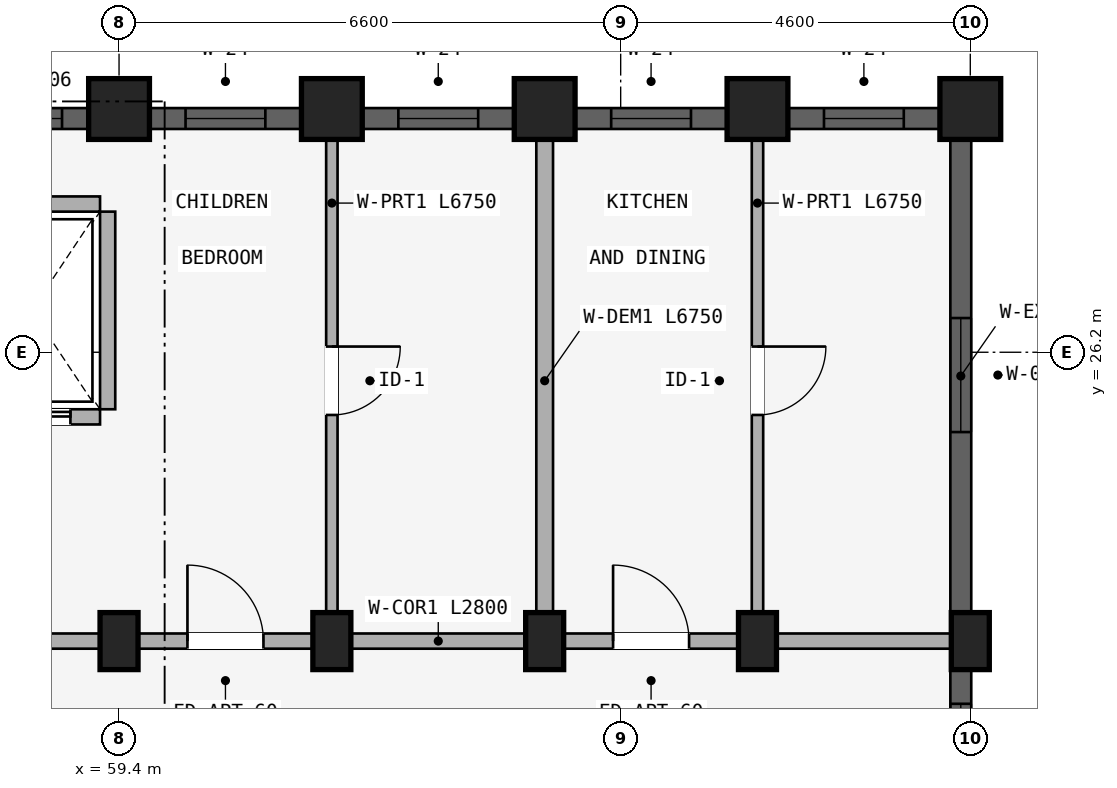
"""IFC4 building model, lengths in metres.
Left out: names, types, materials, properties, quantities, classifications, styles, units other than length and angle.
Written with IfcOpenShell. Run it as: python <this file> out.ifc"""

import sys

from ifc_helpers import new_model, si_unit, direction, frame, frame_2d, origin, origin_2d, place, context, subcontext, project, spatial, rectangle, extrude, element, fill, save


model = new_model("IFC4")
c1 = context("Model", 3, precision=1e-05, world=origin(), true_north=direction((0.0, 1.0)))
c2 = subcontext(c1, "Body", "Model", "MODEL_VIEW")
j1 = project(units=[si_unit("LENGTHUNIT", "METRE"), si_unit("PLANEANGLEUNIT", "RADIAN")], contexts=[c1])
p1 = place(None, origin())
s1 = spatial("IfcSite", under=j1, at=p1, CompositionType="ELEMENT")
p2 = place(p1, origin())
s2 = spatial("IfcBuilding", under=s1, at=p2, CompositionType="ELEMENT")
p3 = place(p2, frame((0.0, 0.0, 8.7)))
s3 = spatial("IfcBuildingStorey", under=s2, at=p3, CompositionType="ELEMENT", Elevation=8.7)
p4 = place(p3, frame((59.4, 29.4, 0.0), z_axis=(0.0, 0.0, 1.0), x_axis=(1.0, 0.0, 0.0)))
e1 = element("IfcColumn", 1, at=p4, inside=s3, PredefinedType="COLUMN", context=c2, shape_type="SweptSolid", body=[
    extrude(rectangle(XDim=0.8, YDim=0.8, at=origin_2d()), origin(), (0.0, 0.0, 1.0), 2.93),
])
p5 = place(p3, frame((59.4, 22.4, 0.0), z_axis=(0.0, 0.0, 1.0), x_axis=(1.0, 0.0, 0.0)))
e2 = element("IfcColumn", 2, at=p5, inside=s3, PredefinedType="COLUMN", context=c2, shape_type="SweptSolid", body=[
    extrude(rectangle(XDim=0.5, YDim=0.75, at=origin_2d()), origin(), (0.0, 0.0, 1.0), 2.93),
])
p6 = place(p3, frame((62.2, 29.4, 0.0), z_axis=(0.0, 0.0, 1.0), x_axis=(1.0, 0.0, 0.0)))
e3 = element("IfcColumn", 3, at=p6, inside=s3, PredefinedType="COLUMN", context=c2, shape_type="SweptSolid", body=[
    extrude(rectangle(XDim=0.8, YDim=0.8, at=origin_2d()), origin(), (0.0, 0.0, 1.0), 2.93),
])
p7 = place(p3, frame((62.2, 22.4, 0.0), z_axis=(0.0, 0.0, 1.0), x_axis=(1.0, 0.0, 0.0)))
e4 = element("IfcColumn", 4, at=p7, inside=s3, PredefinedType="COLUMN", context=c2, shape_type="SweptSolid", body=[
    extrude(rectangle(XDim=0.5, YDim=0.75, at=origin_2d()), origin(), (0.0, 0.0, 1.0), 2.93),
])
p8 = place(p3, frame((65.0, 29.4, 0.0), z_axis=(0.0, 0.0, 1.0), x_axis=(1.0, 0.0, 0.0)))
e5 = element("IfcColumn", 5, at=p8, inside=s3, PredefinedType="COLUMN", context=c2, shape_type="SweptSolid", body=[
    extrude(rectangle(XDim=0.8, YDim=0.8, at=origin_2d()), origin(), (0.0, 0.0, 1.0), 2.93),
])
p9 = place(p3, frame((65.0, 22.4, 0.0), z_axis=(0.0, 0.0, 1.0), x_axis=(1.0, 0.0, 0.0)))
e6 = element("IfcColumn", 6, at=p9, inside=s3, PredefinedType="COLUMN", context=c2, shape_type="SweptSolid", body=[
    extrude(rectangle(XDim=0.5, YDim=0.75, at=origin_2d()), origin(), (0.0, 0.0, 1.0), 2.93),
])
p10 = place(p3, frame((67.8, 29.4, 0.0), z_axis=(0.0, 0.0, 1.0), x_axis=(1.0, 0.0, 0.0)))
e7 = element("IfcColumn", 7, at=p10, inside=s3, PredefinedType="COLUMN", context=c2, shape_type="SweptSolid", body=[
    extrude(rectangle(XDim=0.8, YDim=0.8, at=origin_2d()), origin(), (0.0, 0.0, 1.0), 2.93),
])
p11 = place(p3, frame((67.8, 22.4, 0.0), z_axis=(0.0, 0.0, 1.0), x_axis=(1.0, 0.0, 0.0)))
e8 = element("IfcColumn", 8, at=p11, inside=s3, PredefinedType="COLUMN", context=c2, shape_type="SweptSolid", body=[
    extrude(rectangle(XDim=0.5, YDim=0.75, at=origin_2d()), origin(), (0.0, 0.0, 1.0), 2.93),
])
p12 = place(p3, frame((70.6, 29.4, 0.0), z_axis=(0.0, 0.0, 1.0), x_axis=(1.0, 0.0, 0.0)))
e9 = element("IfcColumn", 9, at=p12, inside=s3, PredefinedType="COLUMN", context=c2, shape_type="SweptSolid", body=[
    extrude(rectangle(XDim=0.8, YDim=0.8, at=origin_2d()), origin(), (0.0, 0.0, 1.0), 2.93),
])
p13 = place(p3, frame((70.6, 22.4, 0.0), z_axis=(0.0, 0.0, 1.0), x_axis=(1.0, 0.0, 0.0)))
e10 = element("IfcColumn", 10, at=p13, inside=s3, PredefinedType="COLUMN", context=c2, shape_type="SweptSolid", body=[
    extrude(rectangle(XDim=0.5, YDim=0.75, at=origin_2d()), origin(), (0.0, 0.0, 1.0), 2.93),
])
p14 = place(p3, frame((59.25, 28.05, 0.0), z_axis=(0.0, 0.0, 1.0), x_axis=(0.0, -1.0, 0.0)))
e11 = element("IfcWall", 11, at=p14, inside=s3, PredefinedType="STANDARD", context=c2, shape_type="SweptSolid", body=[
    extrude(rectangle(XDim=2.6, YDim=0.2, at=frame_2d((1.3, 0.0))), origin(), (0.0, 0.0, 1.0), 2.372),
])
p15 = place(p3, frame((57.35, 28.15, 0.0), z_axis=(0.0, 0.0, 1.0), x_axis=(1.0, 0.0, 0.0)))
e12 = element("IfcWall", 12, at=p15, inside=s3, PredefinedType="STANDARD", context=c2, shape_type="SweptSolid", body=[
    extrude(rectangle(XDim=1.8, YDim=0.2, at=frame_2d((0.9, 0.0))), origin(), (0.0, 0.0, 1.0), 2.93),
])
p16 = place(p3, frame((57.35, 25.35, 0.0), z_axis=(0.0, 0.0, 1.0), x_axis=(1.0, 0.0, 0.0)))
e13 = element("IfcWall", 13, at=p16, inside=s3, PredefinedType="STANDARD", context=c2, shape_type="SweptSolid", body=[
    extrude(rectangle(XDim=1.8, YDim=0.2, at=frame_2d((0.9, 0.0))), origin(), (0.0, 0.0, 1.0), 2.93),
])
p17 = place(p16, frame((0.39, 0.0, 0.0)))
e14 = element("IfcOpeningElement", 14, at=p17, cuts=e13, PredefinedType="OPENING", context=c2, shape_type="SweptSolid", body=[
    extrude(rectangle(XDim=1.02, YDim=2.15, at=frame_2d((0.51, 1.075))), frame((0.0, 0.11, 0.0), z_axis=(0.0, -1.0, 0.0), x_axis=(1.0, 0.0, 0.0)), (0.0, 0.0, 1.0), 0.22),
])
p18 = place(p3, frame((53.75, 22.4, 0.0), z_axis=(0.0, 0.0, 1.0), x_axis=(1.0, 0.0, 0.0)))
e15 = element("IfcWall", 15, at=p18, inside=s3, PredefinedType="STANDARD", context=c2, shape_type="SweptSolid", body=[
    extrude(rectangle(XDim=5.6, YDim=0.2, at=frame_2d((2.8, 0.0))), origin(), (0.0, 0.0, 1.0), 2.372),
])
p19 = place(p18, frame((1.91, 0.0, 0.0)))
e16 = element("IfcOpeningElement", 16, at=p19, cuts=e15, PredefinedType="OPENING", context=c2, shape_type="SweptSolid", body=[
    extrude(rectangle(XDim=1.22, YDim=2.15, at=frame_2d((0.61, 1.075))), frame((0.0, 0.11, 0.0), z_axis=(0.0, -1.0, 0.0), x_axis=(1.0, 0.0, 0.0)), (0.0, 0.0, 1.0), 0.22),
])
p20 = place(p3, frame((59.4, 22.4, 0.0), z_axis=(0.0, 0.0, 1.0), x_axis=(1.0, 0.0, 0.0)))
e17 = element("IfcWall", 17, at=p20, inside=s3, PredefinedType="STANDARD", context=c2, shape_type="SweptSolid", body=[
    extrude(rectangle(XDim=2.8, YDim=0.2, at=frame_2d((1.4, 0.0))), origin(), (0.0, 0.0, 1.0), 2.372),
])
p21 = place(p20, frame((0.9, 0.0, 0.0)))
e18 = element("IfcOpeningElement", 18, at=p21, cuts=e17, PredefinedType="OPENING", context=c2, shape_type="SweptSolid", body=[
    extrude(rectangle(XDim=1.0, YDim=2.15, at=frame_2d((0.5, 1.075))), frame((0.0, 0.11, 0.0), z_axis=(0.0, -1.0, 0.0), x_axis=(1.0, 0.0, 0.0)), (0.0, 0.0, 1.0), 0.22),
])
p22 = place(p3, frame((62.2, 22.4, 0.0), z_axis=(0.0, 0.0, 1.0), x_axis=(1.0, 0.0, 0.0)))
e19 = element("IfcWall", 19, at=p22, inside=s3, PredefinedType="STANDARD", context=c2, shape_type="SweptSolid", body=[
    extrude(rectangle(XDim=2.8, YDim=0.2, at=frame_2d((1.4, 0.0))), origin(), (0.0, 0.0, 1.0), 2.372),
])
p23 = place(p3, frame((65.0, 22.4, 0.0), z_axis=(0.0, 0.0, 1.0), x_axis=(1.0, 0.0, 0.0)))
e20 = element("IfcWall", 20, at=p23, inside=s3, PredefinedType="STANDARD", context=c2, shape_type="SweptSolid", body=[
    extrude(rectangle(XDim=2.8, YDim=0.2, at=frame_2d((1.4, 0.0))), origin(), (0.0, 0.0, 1.0), 2.372),
])
p24 = place(p23, frame((0.9, 0.0, 0.0)))
e21 = element("IfcOpeningElement", 21, at=p24, cuts=e20, PredefinedType="OPENING", context=c2, shape_type="SweptSolid", body=[
    extrude(rectangle(XDim=1.0, YDim=2.15, at=frame_2d((0.5, 1.075))), frame((0.0, 0.11, 0.0), z_axis=(0.0, -1.0, 0.0), x_axis=(1.0, 0.0, 0.0)), (0.0, 0.0, 1.0), 0.22),
])
p25 = place(p3, frame((67.8, 22.4, 0.0), z_axis=(0.0, 0.0, 1.0), x_axis=(1.0, 0.0, 0.0)))
e22 = element("IfcWall", 22, at=p25, inside=s3, PredefinedType="STANDARD", context=c2, shape_type="SweptSolid", body=[
    extrude(rectangle(XDim=2.8, YDim=0.2, at=frame_2d((1.4, 0.0))), origin(), (0.0, 0.0, 1.0), 2.372),
])
p26 = place(p3, frame((62.2, 29.2, 0.0), z_axis=(0.0, 0.0, 1.0), x_axis=(0.0, -1.0, 0.0)))
e23 = element("IfcWall", 23, at=p26, inside=s3, PredefinedType="PARTITIONING", context=c2, shape_type="SweptSolid", body=[
    extrude(rectangle(XDim=6.75, YDim=0.15, at=frame_2d((3.375, 0.0))), origin(), (0.0, 0.0, 1.0), 2.372),
])
p27 = place(p26, frame((2.925, 0.0, 0.0)))
e24 = element("IfcOpeningElement", 24, at=p27, cuts=e23, PredefinedType="OPENING", context=c2, shape_type="SweptSolid", body=[
    extrude(rectangle(XDim=0.9, YDim=2.1, at=frame_2d((0.45, 1.05))), frame((0.0, 0.085, 0.0), z_axis=(0.0, -1.0, 0.0), x_axis=(1.0, 0.0, 0.0)), (0.0, 0.0, 1.0), 0.17),
])
p28 = place(p3, frame((65.0, 29.2, 0.0), z_axis=(0.0, 0.0, 1.0), x_axis=(0.0, -1.0, 0.0)))
e25 = element("IfcWall", 25, at=p28, inside=s3, PredefinedType="STANDARD", context=c2, shape_type="SweptSolid", body=[
    extrude(rectangle(XDim=6.75, YDim=0.22, at=frame_2d((3.375, 0.0))), origin(), (0.0, 0.0, 1.0), 2.372),
])
p29 = place(p3, frame((67.8, 29.2, 0.0), z_axis=(0.0, 0.0, 1.0), x_axis=(0.0, -1.0, 0.0)))
e26 = element("IfcWall", 26, at=p29, inside=s3, PredefinedType="PARTITIONING", context=c2, shape_type="SweptSolid", body=[
    extrude(rectangle(XDim=6.75, YDim=0.15, at=frame_2d((3.375, 0.0))), origin(), (0.0, 0.0, 1.0), 2.372),
])
p30 = place(p29, frame((2.925, 0.0, 0.0)))
e27 = element("IfcOpeningElement", 27, at=p30, cuts=e26, PredefinedType="OPENING", context=c2, shape_type="SweptSolid", body=[
    extrude(rectangle(XDim=0.9, YDim=2.1, at=frame_2d((0.45, 1.05))), frame((0.0, 0.085, 0.0), z_axis=(0.0, -1.0, 0.0), x_axis=(1.0, 0.0, 0.0)), (0.0, 0.0, 1.0), 0.17),
])
p31 = place(p3, frame((56.628, 29.275, 0.0), z_axis=(0.0, 0.0, 1.0), x_axis=(1.0, 0.0, 0.0)))
e28 = element("IfcWall", 28, at=p31, inside=s3, PredefinedType="STANDARD", context=c2, shape_type="SweptSolid", body=[
    extrude(rectangle(XDim=2.422, YDim=0.275, at=frame_2d((1.211, 0.0))), origin(), (0.0, 0.0, 1.0), 2.472),
])
p32 = place(p31, frame((0.822, 0.0, 0.772)))
e29 = element("IfcOpeningElement", 29, at=p32, cuts=e28, PredefinedType="OPENING", context=c2, shape_type="SweptSolid", body=[
    extrude(rectangle(XDim=1.2, YDim=1.5, at=frame_2d((0.6, 0.75))), frame((0.0, 0.147, 0.0), z_axis=(0.0, -1.0, 0.0), x_axis=(1.0, 0.0, 0.0)), (0.0, 0.0, 1.0), 0.295),
])
p33 = place(p3, frame((59.803, 29.275, 0.0), z_axis=(0.0, 0.0, 1.0), x_axis=(1.0, 0.0, 0.0)))
e30 = element("IfcWall", 30, at=p33, inside=s3, PredefinedType="STANDARD", context=c2, shape_type="SweptSolid", body=[
    extrude(rectangle(XDim=1.993, YDim=0.275, at=frame_2d((0.997, 0.0))), origin(), (0.0, 0.0, 1.0), 2.472),
])
p34 = place(p33, frame((0.471, 0.0, 0.88)))
e31 = element("IfcOpeningElement", 31, at=p34, cuts=e30, PredefinedType="OPENING", context=c2, shape_type="SweptSolid", body=[
    extrude(rectangle(XDim=1.05, YDim=1.25, at=frame_2d((0.525, 0.625))), frame((0.0, 0.147, 0.0), z_axis=(0.0, -1.0, 0.0), x_axis=(1.0, 0.0, 0.0)), (0.0, 0.0, 1.0), 0.295),
])
p35 = place(p3, frame((62.604, 29.275, 0.0), z_axis=(0.0, 0.0, 1.0), x_axis=(1.0, 0.0, 0.0)))
e32 = element("IfcWall", 32, at=p35, inside=s3, PredefinedType="STANDARD", context=c2, shape_type="SweptSolid", body=[
    extrude(rectangle(XDim=1.993, YDim=0.275, at=frame_2d((0.997, 0.0))), origin(), (0.0, 0.0, 1.0), 2.472),
])
p36 = place(p35, frame((0.471, 0.0, 0.88)))
e33 = element("IfcOpeningElement", 33, at=p36, cuts=e32, PredefinedType="OPENING", context=c2, shape_type="SweptSolid", body=[
    extrude(rectangle(XDim=1.05, YDim=1.25, at=frame_2d((0.525, 0.625))), frame((0.0, 0.147, 0.0), z_axis=(0.0, -1.0, 0.0), x_axis=(1.0, 0.0, 0.0)), (0.0, 0.0, 1.0), 0.295),
])
p37 = place(p3, frame((65.404, 29.275, 0.0), z_axis=(0.0, 0.0, 1.0), x_axis=(1.0, 0.0, 0.0)))
e34 = element("IfcWall", 34, at=p37, inside=s3, PredefinedType="STANDARD", context=c2, shape_type="SweptSolid", body=[
    extrude(rectangle(XDim=1.993, YDim=0.275, at=frame_2d((0.997, 0.0))), origin(), (0.0, 0.0, 1.0), 2.472),
])
p38 = place(p37, frame((0.471, 0.0, 0.88)))
e35 = element("IfcOpeningElement", 35, at=p38, cuts=e34, PredefinedType="OPENING", context=c2, shape_type="SweptSolid", body=[
    extrude(rectangle(XDim=1.05, YDim=1.25, at=frame_2d((0.525, 0.625))), frame((0.0, 0.147, 0.0), z_axis=(0.0, -1.0, 0.0), x_axis=(1.0, 0.0, 0.0)), (0.0, 0.0, 1.0), 0.295),
])
p39 = place(p3, frame((68.204, 29.275, 0.0), z_axis=(0.0, 0.0, 1.0), x_axis=(1.0, 0.0, 0.0)))
e36 = element("IfcWall", 36, at=p39, inside=s3, PredefinedType="STANDARD", context=c2, shape_type="SweptSolid", body=[
    extrude(rectangle(XDim=1.993, YDim=0.275, at=frame_2d((0.997, 0.0))), origin(), (0.0, 0.0, 1.0), 2.472),
])
p40 = place(p39, frame((0.471, 0.0, 0.88)))
e37 = element("IfcOpeningElement", 37, at=p40, cuts=e36, PredefinedType="OPENING", context=c2, shape_type="SweptSolid", body=[
    extrude(rectangle(XDim=1.05, YDim=1.25, at=frame_2d((0.525, 0.625))), frame((0.0, 0.147, 0.0), z_axis=(0.0, -1.0, 0.0), x_axis=(1.0, 0.0, 0.0)), (0.0, 0.0, 1.0), 0.295),
])
p41 = place(p3, frame((70.475, 28.997, 0.0), z_axis=(0.0, 0.0, 1.0), x_axis=(0.0, -1.0, 0.0)))
e38 = element("IfcWall", 38, at=p41, inside=s3, PredefinedType="STANDARD", context=c2, shape_type="SweptSolid", body=[
    extrude(rectangle(XDim=6.218, YDim=0.275, at=frame_2d((3.109, 0.0))), origin(), (0.0, 0.0, 1.0), 2.372),
])
p42 = place(p41, frame((2.346, 0.0, 0.522)))
e39 = element("IfcOpeningElement", 39, at=p42, cuts=e38, PredefinedType="OPENING", context=c2, shape_type="SweptSolid", body=[
    extrude(rectangle(XDim=1.5, YDim=1.65, at=frame_2d((0.75, 0.825))), frame((0.0, 0.147, 0.0), z_axis=(0.0, -1.0, 0.0), x_axis=(1.0, 0.0, 0.0)), (0.0, 0.0, 1.0), 0.295),
])
p43 = place(p3, frame((70.475, 22.021, 0.0), z_axis=(0.0, 0.0, 1.0), x_axis=(0.0, -1.0, 0.0)))
e40 = element("IfcWall", 40, at=p43, inside=s3, PredefinedType="STANDARD", context=c2, shape_type="SweptSolid", body=[
    extrude(rectangle(XDim=1.643, YDim=0.275, at=frame_2d((0.822, 0.0))), origin(), (0.0, 0.0, 1.0), 2.372),
])
p44 = place(p43, frame((0.447, 0.0, 0.88)))
e41 = element("IfcOpeningElement", 41, at=p44, cuts=e40, PredefinedType="OPENING", context=c2, shape_type="SweptSolid", body=[
    extrude(rectangle(XDim=0.75, YDim=1.05, at=frame_2d((0.375, 0.525))), frame((0.0, 0.147, 0.0), z_axis=(0.0, -1.0, 0.0), x_axis=(1.0, 0.0, 0.0)), (0.0, 0.0, 1.0), 0.295),
])
p45 = place(p32, origin())
e42 = element("IfcWindow", 42, at=p45, inside=s3, PartitioningType="SINGLE_PANEL", PredefinedType="WINDOW", context=c2, shape_type="SweptSolid", body=[
    extrude(rectangle(XDim=1.2, YDim=1.5, at=frame_2d((0.6, 0.75))), frame((0.0, 0.03, 0.0), z_axis=(0.0, -1.0, 0.0), x_axis=(1.0, 0.0, 0.0)), (0.0, 0.0, 1.0), 0.06),
])
fill(e29, e42)
p46 = place(p34, origin())
e43 = element("IfcWindow", 43, at=p46, inside=s3, PartitioningType="SINGLE_PANEL", PredefinedType="WINDOW", context=c2, shape_type="SweptSolid", body=[
    extrude(rectangle(XDim=1.05, YDim=1.25, at=frame_2d((0.525, 0.625))), frame((0.0, 0.03, 0.0), z_axis=(0.0, -1.0, 0.0), x_axis=(1.0, 0.0, 0.0)), (0.0, 0.0, 1.0), 0.06),
])
fill(e31, e43)
p47 = place(p36, origin())
e44 = element("IfcWindow", 44, at=p47, inside=s3, PartitioningType="SINGLE_PANEL", PredefinedType="WINDOW", context=c2, shape_type="SweptSolid", body=[
    extrude(rectangle(XDim=1.05, YDim=1.25, at=frame_2d((0.525, 0.625))), frame((0.0, 0.03, 0.0), z_axis=(0.0, -1.0, 0.0), x_axis=(1.0, 0.0, 0.0)), (0.0, 0.0, 1.0), 0.06),
])
fill(e33, e44)
p48 = place(p38, origin())
e45 = element("IfcWindow", 45, at=p48, inside=s3, PartitioningType="SINGLE_PANEL", PredefinedType="WINDOW", context=c2, shape_type="SweptSolid", body=[
    extrude(rectangle(XDim=1.05, YDim=1.25, at=frame_2d((0.525, 0.625))), frame((0.0, 0.03, 0.0), z_axis=(0.0, -1.0, 0.0), x_axis=(1.0, 0.0, 0.0)), (0.0, 0.0, 1.0), 0.06),
])
fill(e35, e45)
p49 = place(p40, origin())
e46 = element("IfcWindow", 46, at=p49, inside=s3, PartitioningType="SINGLE_PANEL", PredefinedType="WINDOW", context=c2, shape_type="SweptSolid", body=[
    extrude(rectangle(XDim=1.05, YDim=1.25, at=frame_2d((0.525, 0.625))), frame((0.0, 0.03, 0.0), z_axis=(0.0, -1.0, 0.0), x_axis=(1.0, 0.0, 0.0)), (0.0, 0.0, 1.0), 0.06),
])
fill(e37, e46)
p50 = place(p42, origin())
e47 = element("IfcWindow", 47, at=p50, inside=s3, PartitioningType="DOUBLE_PANEL_VERTICAL", PredefinedType="WINDOW", context=c2, shape_type="SweptSolid", body=[
    extrude(rectangle(XDim=1.5, YDim=1.65, at=frame_2d((0.75, 0.825))), frame((0.0, 0.03, 0.0), z_axis=(0.0, -1.0, 0.0), x_axis=(1.0, 0.0, 0.0)), (0.0, 0.0, 1.0), 0.06),
])
fill(e39, e47)
p51 = place(p44, origin())
e48 = element("IfcWindow", 48, at=p51, inside=s3, PartitioningType="SINGLE_PANEL", PredefinedType="WINDOW", context=c2, shape_type="SweptSolid", body=[
    extrude(rectangle(XDim=0.75, YDim=1.05, at=frame_2d((0.375, 0.525))), frame((0.0, 0.03, 0.0), z_axis=(0.0, -1.0, 0.0), x_axis=(1.0, 0.0, 0.0)), (0.0, 0.0, 1.0), 0.06),
])
fill(e41, e48)
p52 = place(p17, origin())
e49 = element("IfcDoor", 49, at=p52, inside=s3, OperationType="SLIDING_TO_RIGHT", PredefinedType="DOOR", context=c2, shape_type="SweptSolid", body=[
    extrude(rectangle(XDim=1.02, YDim=2.15, at=frame_2d((0.51, 1.075))), frame((0.0, 0.025, 0.0), z_axis=(0.0, -1.0, 0.0), x_axis=(1.0, 0.0, 0.0)), (0.0, 0.0, 1.0), 0.05),
])
fill(e14, e49)
p53 = place(p21, origin())
e50 = element("IfcDoor", 50, at=p53, inside=s3, OperationType="SINGLE_SWING_LEFT", PredefinedType="DOOR", context=c2, shape_type="SweptSolid", body=[
    extrude(rectangle(XDim=1.0, YDim=2.15, at=frame_2d((0.5, 1.075))), frame((0.0, 0.025, 0.0), z_axis=(0.0, -1.0, 0.0), x_axis=(1.0, 0.0, 0.0)), (0.0, 0.0, 1.0), 0.05),
])
fill(e18, e50)
p54 = place(p24, origin())
e51 = element("IfcDoor", 51, at=p54, inside=s3, OperationType="SINGLE_SWING_LEFT", PredefinedType="DOOR", context=c2, shape_type="SweptSolid", body=[
    extrude(rectangle(XDim=1.0, YDim=2.15, at=frame_2d((0.5, 1.075))), frame((0.0, 0.025, 0.0), z_axis=(0.0, -1.0, 0.0), x_axis=(1.0, 0.0, 0.0)), (0.0, 0.0, 1.0), 0.05),
])
fill(e21, e51)
p55 = place(p27, frame((0.9, 0.0, 0.0), z_axis=(0.0, 0.0, 1.0), x_axis=(-1.0, 0.0, 0.0)))
e52 = element("IfcDoor", 52, at=p55, inside=s3, OperationType="SINGLE_SWING_RIGHT", PredefinedType="DOOR", context=c2, shape_type="SweptSolid", body=[
    extrude(rectangle(XDim=0.9, YDim=2.1, at=frame_2d((0.45, 1.05))), frame((0.0, 0.025, 0.0), z_axis=(0.0, -1.0, 0.0), x_axis=(1.0, 0.0, 0.0)), (0.0, 0.0, 1.0), 0.05),
])
fill(e24, e52)
p56 = place(p30, origin())
e53 = element("IfcDoor", 53, at=p56, inside=s3, OperationType="SINGLE_SWING_LEFT", PredefinedType="DOOR", context=c2, shape_type="SweptSolid", body=[
    extrude(rectangle(XDim=0.9, YDim=2.1, at=frame_2d((0.45, 1.05))), frame((0.0, 0.025, 0.0), z_axis=(0.0, -1.0, 0.0), x_axis=(1.0, 0.0, 0.0)), (0.0, 0.0, 1.0), 0.05),
])
fill(e27, e53)
save(model, sys.argv[1])
